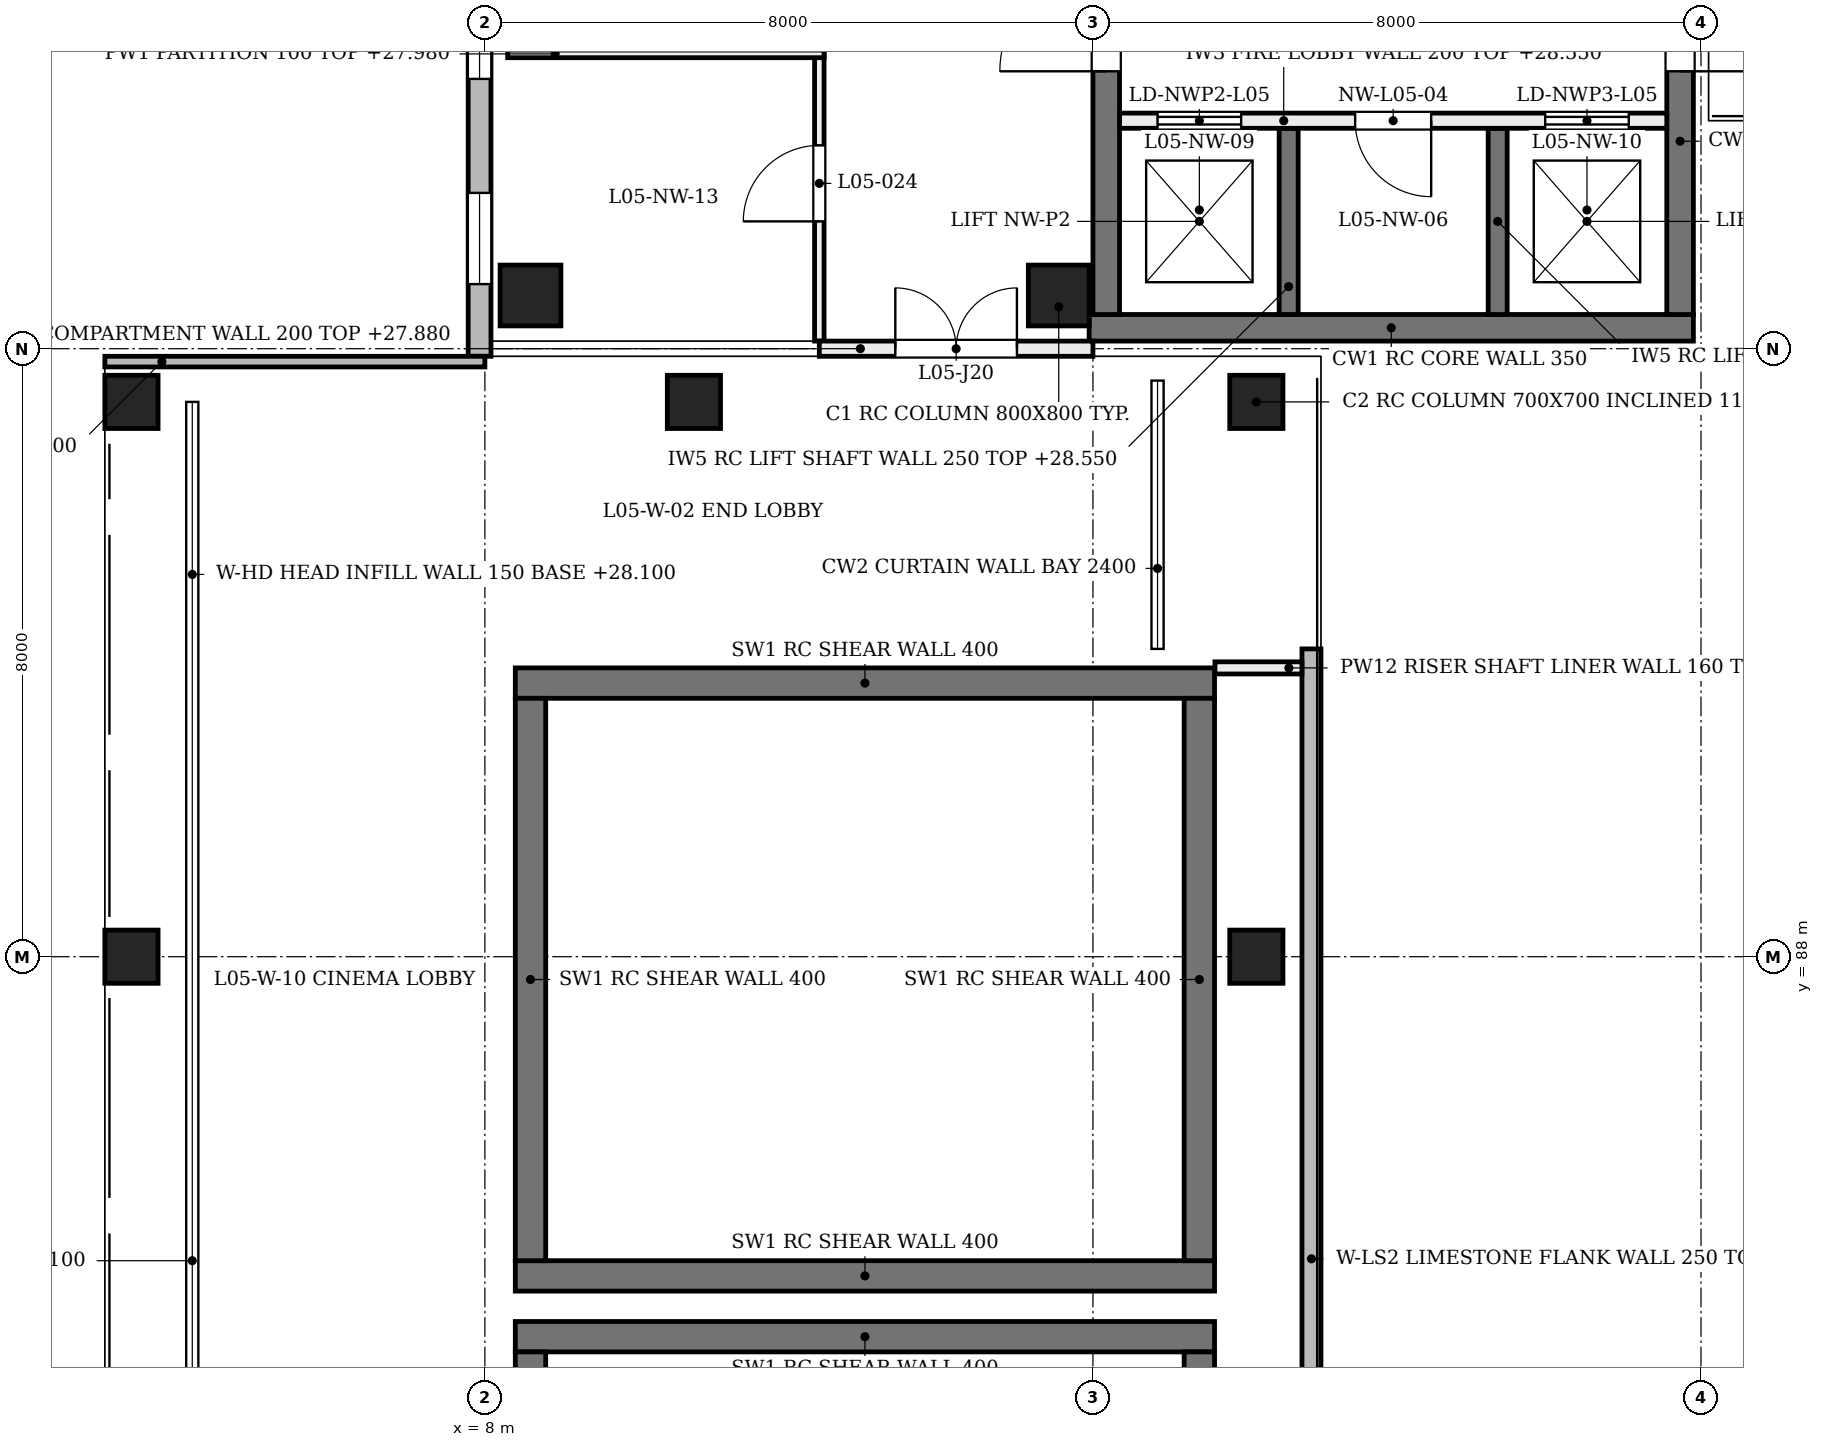
"""IFC4 building model, lengths in metres.
Left out: names, types, materials, properties, quantities, classifications, styles, units other than length and angle.
Written with IfcOpenShell. Run it as: python <this file> out.ifc"""

import sys

from ifc_helpers import new_model, si_unit, direction, frame, frame_2d, origin, origin_2d, place, context, subcontext, project, spatial, rectangle, extrude, element, fill, save


model = new_model("IFC4")
c1 = context("Model", 3, precision=1e-05, world=origin(), true_north=direction((0.0, 1.0)))
c2 = subcontext(c1, "Body", "Model", "MODEL_VIEW")
j1 = project(units=[si_unit("LENGTHUNIT", "METRE"), si_unit("PLANEANGLEUNIT", "RADIAN")], contexts=[c1])
p1 = place(None, origin())
s1 = spatial("IfcSite", under=j1, at=p1, CompositionType="ELEMENT")
p2 = place(p1, origin())
s2 = spatial("IfcBuilding", under=s1, at=p2, CompositionType="ELEMENT")
p3 = place(p2, frame((0.0, 0.0, 24.0)))
s3 = spatial("IfcBuildingStorey", under=s2, at=p3, CompositionType="ELEMENT", Elevation=24.0)
p4 = place(p3, frame((8.4, 83.0, 0.0), z_axis=(0.0, 0.0, 1.0), x_axis=(1.0, 0.0, 0.0)))
e1 = element("IfcWall", 1, at=p4, inside=s3, PredefinedType="SHEAR", context=c2, shape_type="SweptSolid", body=[
    extrude(rectangle(XDim=9.2, YDim=0.4, at=frame_2d((4.6, 0.0))), origin(), (0.0, 0.0, 1.0), 4.58),
])
for number, where, z_axis, x_axis in (
    (2, (8.6, 75.8, 0.0), (0.0, 0.0, 1.0), (0.0, 1.0, 0.0)),
    (3, (17.4, 75.8, 0.0), (0.0, 0.0, 1.0), (0.0, 1.0, 0.0)),
):
    element("IfcWall", number, at=place(p3, frame(where, z_axis=z_axis, x_axis=x_axis)), inside=s3, PredefinedType="SHEAR", context=c2, shape_type="SweptSolid", body=[
        extrude(rectangle(XDim=7.0, YDim=0.4, at=frame_2d((3.5, 0.0))), origin(), (0.0, 0.0, 1.0), 4.58),
    ])
for number, where, z_axis, x_axis in (
    (4, (8.4, 83.8, 0.0), (0.0, 0.0, 1.0), (1.0, 0.0, 0.0)),
    (5, (8.4, 91.6, 0.0), (0.0, 0.0, 1.0), (1.0, 0.0, 0.0)),
):
    element("IfcWall", number, at=place(p3, frame(where, z_axis=z_axis, x_axis=x_axis)), inside=s3, PredefinedType="SHEAR", context=c2, shape_type="SweptSolid", body=[
        extrude(rectangle(XDim=9.2, YDim=0.4, at=frame_2d((4.6, 0.0))), origin(), (0.0, 0.0, 1.0), 4.58),
    ])
for number, where, z_axis, x_axis in (
    (6, (8.6, 84.0, 0.0), (0.0, 0.0, 1.0), (0.0, 1.0, 0.0)),
    (7, (17.4, 84.0, 0.0), (0.0, 0.0, 1.0), (0.0, 1.0, 0.0)),
):
    element("IfcWall", number, at=place(p3, frame(where, z_axis=z_axis, x_axis=x_axis)), inside=s3, PredefinedType="SHEAR", context=c2, shape_type="SweptSolid", body=[
        extrude(rectangle(XDim=7.4, YDim=0.4, at=frame_2d((3.7, 0.0))), origin(), (0.0, 0.0, 1.0), 4.58),
    ])
p5 = place(p3, frame((15.95, 96.275, 0.0), z_axis=(0.0, 0.0, 1.0), x_axis=(1.0, 0.0, 0.0)))
e8 = element("IfcWall", 8, at=p5, inside=s3, PredefinedType="SHEAR", context=c2, shape_type="SweptSolid", body=[
    extrude(rectangle(XDim=7.95, YDim=0.35, at=frame_2d((3.975, 0.0))), origin(), (0.0, 0.0, 1.0), 4.58),
])
p6 = place(p3, frame((16.175, 96.45, 0.0), z_axis=(0.0, 0.0, 1.0), x_axis=(0.0, 1.0, 0.0)))
e9 = element("IfcWall", 9, at=p6, inside=s3, PredefinedType="SHEAR", context=c2, shape_type="SweptSolid", body=[
    extrude(rectangle(XDim=15.2, YDim=0.35, at=frame_2d((7.6, 0.0))), origin(), (0.0, 0.0, 1.0), 4.58),
])
p7 = place(p6, frame((13.25, 0.0, 0.0)))
e10 = element("IfcOpeningElement", 10, at=p7, cuts=e9, PredefinedType="OPENING", context=c2, shape_type="SweptSolid", body=[
    extrude(rectangle(XDim=1.0, YDim=2.1, at=frame_2d((0.5, 1.05))), frame((0.0, 0.185, 0.0), z_axis=(0.0, -1.0, 0.0), x_axis=(1.0, 0.0, 0.0)), (0.0, 0.0, 1.0), 0.37),
])
p8 = place(p6, frame((3.2, 0.0, 0.0)))
e11 = element("IfcOpeningElement", 11, at=p8, cuts=e9, PredefinedType="OPENING", context=c2, shape_type="SweptSolid", body=[
    extrude(rectangle(XDim=1.4, YDim=2.1, at=frame_2d((0.7, 1.05))), frame((0.0, 0.185, 0.0), z_axis=(0.0, -1.0, 0.0), x_axis=(1.0, 0.0, 0.0)), (0.0, 0.0, 1.0), 0.37),
])
p9 = place(p3, frame((23.725, 96.45, 0.0), z_axis=(0.0, 0.0, 1.0), x_axis=(0.0, 1.0, 0.0)))
e12 = element("IfcWall", 12, at=p9, inside=s3, PredefinedType="SHEAR", context=c2, shape_type="SweptSolid", body=[
    extrude(rectangle(XDim=15.2, YDim=0.35, at=frame_2d((7.6, 0.0))), origin(), (0.0, 0.0, 1.0), 4.58),
])
p10 = place(p9, frame((13.25, 0.0, 0.0)))
e13 = element("IfcOpeningElement", 13, at=p10, cuts=e12, PredefinedType="OPENING", context=c2, shape_type="SweptSolid", body=[
    extrude(rectangle(XDim=1.0, YDim=2.1, at=frame_2d((0.5, 1.05))), frame((0.0, 0.185, 0.0), z_axis=(0.0, -1.0, 0.0), x_axis=(1.0, 0.0, 0.0)), (0.0, 0.0, 1.0), 0.37),
])
p11 = place(p9, frame((3.2, 0.0, 0.0)))
e14 = element("IfcOpeningElement", 14, at=p11, cuts=e12, PredefinedType="OPENING", context=c2, shape_type="SweptSolid", body=[
    extrude(rectangle(XDim=1.4, YDim=2.1, at=frame_2d((0.7, 1.05))), frame((0.0, 0.185, 0.0), z_axis=(0.0, -1.0, 0.0), x_axis=(1.0, 0.0, 0.0)), (0.0, 0.0, 1.0), 0.37),
])
for number, where, z_axis, x_axis in (
    (15, (8.6, 96.7, 0.0), (0.0, 0.0, 1.0), (1.0, 0.0, 0.0)),
    (16, (15.55, 96.7, 0.0), (0.0, 0.0, 1.0), (1.0, 0.0, 0.0)),
):
    element("IfcColumn", number, at=place(p3, frame(where, z_axis=z_axis, x_axis=x_axis)), inside=s3, PredefinedType="COLUMN", context=c2, shape_type="SweptSolid", body=[
        extrude(rectangle(XDim=0.8, YDim=0.8, at=origin_2d()), origin(), (0.0, 0.0, 1.0), 4.58),
    ])
for number, where, z_axis, x_axis in (
    (17, (3.6, 88.0, 0.0), (-0.204, 0.0, 0.979), (0.0, -1.0, 0.0)),
    (18, (3.6, 95.3, 0.0), (-0.204, 0.0, 0.979), (0.0, -1.0, 0.0)),
    (19, (11.0, 95.3, 0.0), (-0.204, 0.0, 0.979), (0.0, -1.0, 0.0)),
    (20, (18.4, 88.0, 0.0), (-0.204, 0.0, 0.979), (0.0, -1.0, 0.0)),
    (21, (18.4, 95.3, 0.0), (-0.204, 0.0, 0.979), (0.0, -1.0, 0.0)),
):
    element("IfcColumn", number, at=place(p3, frame(where, z_axis=z_axis, x_axis=x_axis)), inside=s3, PredefinedType="COLUMN", context=c2, shape_type="SweptSolid", body=[
        extrude(rectangle(XDim=0.7, YDim=0.7, at=origin_2d()), origin(), (0.0, 0.0, 1.0), 4.678),
    ])
p12 = place(p3, frame((4.15, 80.2, 4.1), z_axis=(0.0, 0.0, 1.0), x_axis=(0.0, 1.0, 0.0)))
e22 = element("IfcWall", 22, at=p12, inside=s3, PredefinedType="SOLIDWALL", context=c2, shape_type="SweptSolid", body=[
    extrude(rectangle(XDim=7.6, YDim=0.15, at=frame_2d((3.8, 0.0))), origin(), (0.0, 0.0, 1.0), 0.48),
])
p13 = place(p3, frame((4.15, 88.2, 4.1), z_axis=(0.0, 0.0, 1.0), x_axis=(0.0, 1.0, 0.0)))
e23 = element("IfcWall", 23, at=p13, inside=s3, PredefinedType="SOLIDWALL", context=c2, shape_type="SweptSolid", body=[
    extrude(rectangle(XDim=6.9, YDim=0.15, at=frame_2d((3.45, 0.0))), origin(), (0.0, 0.0, 1.0), 0.48),
])
p14 = place(p3, frame((18.875, 67.95, 0.0), z_axis=(0.0, 0.0, 1.0), x_axis=(0.0, 1.0, 0.0)))
e24 = element("IfcWall", 24, at=p14, inside=s3, PredefinedType="SOLIDWALL", context=c2, shape_type="SweptSolid", body=[
    extrude(rectangle(XDim=24.1, YDim=0.25, at=frame_2d((12.05, 0.0))), origin(), (0.0, 0.0, 1.0), 3.9),
])
p15 = place(p3, frame((7.93, 95.9, 0.0), z_axis=(0.0, 0.0, 1.0), x_axis=(0.0, 1.0, 0.0)))
e25 = element("IfcWall", 25, at=p15, inside=s3, PredefinedType="SOLIDWALL", context=c2, shape_type="SweptSolid", body=[
    extrude(rectangle(XDim=16.4, YDim=0.3, at=frame_2d((8.2, 0.0))), origin(), (0.0, 0.0, 1.0), 3.9),
])
p16 = place(p15, frame((0.95, 0.0, 1.0)))
e26 = element("IfcOpeningElement", 26, at=p16, cuts=e25, PredefinedType="OPENING", context=c2, shape_type="SweptSolid", body=[
    extrude(rectangle(XDim=1.2, YDim=2.4, at=frame_2d((0.6, 1.2))), frame((0.0, 0.16, 0.0), z_axis=(0.0, -1.0, 0.0), x_axis=(1.0, 0.0, 0.0)), (0.0, 0.0, 1.0), 0.32),
])
p17 = place(p15, frame((3.65, 0.0, 1.0)))
e27 = element("IfcOpeningElement", 27, at=p17, cuts=e25, PredefinedType="OPENING", context=c2, shape_type="SweptSolid", body=[
    extrude(rectangle(XDim=1.2, YDim=2.4, at=frame_2d((0.6, 1.2))), frame((0.0, 0.16, 0.0), z_axis=(0.0, -1.0, 0.0), x_axis=(1.0, 0.0, 0.0)), (0.0, 0.0, 1.0), 0.32),
])
p18 = place(p15, frame((6.35, 0.0, 1.0)))
e28 = element("IfcOpeningElement", 28, at=p18, cuts=e25, PredefinedType="OPENING", context=c2, shape_type="SweptSolid", body=[
    extrude(rectangle(XDim=1.2, YDim=2.4, at=frame_2d((0.6, 1.2))), frame((0.0, 0.16, 0.0), z_axis=(0.0, -1.0, 0.0), x_axis=(1.0, 0.0, 0.0)), (0.0, 0.0, 1.0), 0.32),
])
p19 = place(p15, frame((9.05, 0.0, 1.0)))
e29 = element("IfcOpeningElement", 29, at=p19, cuts=e25, PredefinedType="OPENING", context=c2, shape_type="SweptSolid", body=[
    extrude(rectangle(XDim=1.2, YDim=2.4, at=frame_2d((0.6, 1.2))), frame((0.0, 0.16, 0.0), z_axis=(0.0, -1.0, 0.0), x_axis=(1.0, 0.0, 0.0)), (0.0, 0.0, 1.0), 0.32),
])
p20 = place(p15, frame((11.75, 0.0, 1.0)))
e30 = element("IfcOpeningElement", 30, at=p20, cuts=e25, PredefinedType="OPENING", context=c2, shape_type="SweptSolid", body=[
    extrude(rectangle(XDim=1.2, YDim=2.4, at=frame_2d((0.6, 1.2))), frame((0.0, 0.16, 0.0), z_axis=(0.0, -1.0, 0.0), x_axis=(1.0, 0.0, 0.0)), (0.0, 0.0, 1.0), 0.32),
])
p21 = place(p15, frame((14.45, 0.0, 1.0)))
e31 = element("IfcOpeningElement", 31, at=p21, cuts=e25, PredefinedType="OPENING", context=c2, shape_type="SweptSolid", body=[
    extrude(rectangle(XDim=1.2, YDim=2.4, at=frame_2d((0.6, 1.2))), frame((0.0, 0.16, 0.0), z_axis=(0.0, -1.0, 0.0), x_axis=(1.0, 0.0, 0.0)), (0.0, 0.0, 1.0), 0.32),
])
p22 = place(p3, frame((3.0, 95.83, 0.0), z_axis=(0.0, 0.0, 1.0), x_axis=(1.0, 0.0, 0.0)))
e32 = element("IfcWall", 32, at=p22, inside=s3, PredefinedType="SOLIDWALL", context=c2, shape_type="SweptSolid", body=[
    extrude(rectangle(XDim=5.0, YDim=0.14, at=frame_2d((2.5, 0.0))), origin(), (0.0, 0.0, 1.0), 3.9),
])
for number, where, z_axis, x_axis in (
    (33, (18.575, 98.9, 0.0), (0.0, 0.0, 1.0), (0.0, -1.0, 0.0)),
    (34, (21.325, 98.9, 0.0), (0.0, 0.0, 1.0), (0.0, -1.0, 0.0)),
):
    element("IfcWall", number, at=place(p3, frame(where, z_axis=z_axis, x_axis=x_axis)), inside=s3, PredefinedType="SOLIDWALL", context=c2, shape_type="SweptSolid", body=[
        extrude(rectangle(XDim=2.45, YDim=0.25, at=frame_2d((1.225, 0.0))), origin(), (0.0, 0.0, 1.0), 4.55),
    ])
p23 = place(p3, frame((16.35, 99.0, 0.0), z_axis=(0.0, 0.0, 1.0), x_axis=(1.0, 0.0, 0.0)))
e35 = element("IfcWall", 35, at=p23, inside=s3, PredefinedType="SOLIDWALL", context=c2, shape_type="SweptSolid", body=[
    extrude(rectangle(XDim=7.2, YDim=0.2, at=frame_2d((3.6, 0.0))), origin(), (0.0, 0.0, 1.0), 4.55),
])
p24 = place(p23, frame((0.5, 0.0, 0.0)))
e36 = element("IfcOpeningElement", 36, at=p24, cuts=e35, PredefinedType="OPENING", context=c2, shape_type="SweptSolid", body=[
    extrude(rectangle(XDim=1.1, YDim=2.1, at=frame_2d((0.55, 1.05))), frame((0.0, 0.11, 0.0), z_axis=(0.0, -1.0, 0.0), x_axis=(1.0, 0.0, 0.0)), (0.0, 0.0, 1.0), 0.22),
])
p25 = place(p23, frame((5.6, 0.0, 0.0)))
e37 = element("IfcOpeningElement", 37, at=p25, cuts=e35, PredefinedType="OPENING", context=c2, shape_type="SweptSolid", body=[
    extrude(rectangle(XDim=1.1, YDim=2.1, at=frame_2d((0.55, 1.05))), frame((0.0, 0.11, 0.0), z_axis=(0.0, -1.0, 0.0), x_axis=(1.0, 0.0, 0.0)), (0.0, 0.0, 1.0), 0.22),
])
p26 = place(p23, frame((3.1, 0.0, 0.0)))
e38 = element("IfcOpeningElement", 38, at=p26, cuts=e35, PredefinedType="OPENING", context=c2, shape_type="SweptSolid", body=[
    extrude(rectangle(XDim=1.0, YDim=2.1, at=frame_2d((0.5, 1.05))), frame((0.0, 0.11, 0.0), z_axis=(0.0, -1.0, 0.0), x_axis=(1.0, 0.0, 0.0)), (0.0, 0.0, 1.0), 0.22),
])
p27 = place(p3, frame((17.605, 91.8, 0.0), z_axis=(0.0, 0.0, 1.0), x_axis=(1.0, 0.0, 0.0)))
e39 = element("IfcWall", 39, at=p27, inside=s3, PredefinedType="PARTITIONING", context=c2, shape_type="SweptSolid", body=[
    extrude(rectangle(XDim=1.145, YDim=0.16, at=frame_2d((0.573, 0.0))), origin(), (0.0, 0.0, 1.0), 3.88),
])
p28 = place(p3, frame((12.4, 96.1, 0.0), z_axis=(0.0, 0.0, 1.0), x_axis=(0.0, 1.0, 0.0)))
e40 = element("IfcWall", 40, at=p28, inside=s3, PredefinedType="PARTITIONING", context=c2, shape_type="SweptSolid", body=[
    extrude(rectangle(XDim=8.844, YDim=0.125, at=frame_2d((4.422, 0.0))), origin(), (0.0, 0.0, 1.0), 3.88),
])
p29 = place(p28, frame((6.117, 0.0, 0.0)))
e41 = element("IfcOpeningElement", 41, at=p29, cuts=e40, PredefinedType="OPENING", context=c2, shape_type="SweptSolid", body=[
    extrude(rectangle(XDim=1.0, YDim=2.1, at=frame_2d((0.5, 1.05))), frame((0.0, 0.073, 0.0), z_axis=(0.0, -1.0, 0.0), x_axis=(1.0, 0.0, 0.0)), (0.0, 0.0, 1.0), 0.145),
])
p30 = place(p28, frame((1.575, 0.0, 0.0)))
e42 = element("IfcOpeningElement", 42, at=p30, cuts=e40, PredefinedType="OPENING", context=c2, shape_type="SweptSolid", body=[
    extrude(rectangle(XDim=1.0, YDim=2.1, at=frame_2d((0.5, 1.05))), frame((0.0, 0.073, 0.0), z_axis=(0.0, -1.0, 0.0), x_axis=(1.0, 0.0, 0.0)), (0.0, 0.0, 1.0), 0.145),
])
p31 = place(p3, frame((8.3, 99.879, 0.0), z_axis=(0.0, 0.0, 1.0), x_axis=(1.0, 0.0, 0.0)))
e43 = element("IfcWall", 43, at=p31, inside=s3, PredefinedType="PARTITIONING", context=c2, shape_type="SweptSolid", body=[
    extrude(rectangle(XDim=4.162, YDim=0.1, at=frame_2d((2.081, 0.0))), origin(), (0.0, 0.0, 1.0), 3.98),
])
p32 = place(p3, frame((12.4, 96.0, 0.0), z_axis=(0.0, 0.0, 1.0), x_axis=(1.0, 0.0, 0.0)))
e44 = element("IfcWall", 44, at=p32, inside=s3, PredefinedType="PARTITIONING", context=c2, shape_type="SweptSolid", body=[
    extrude(rectangle(XDim=3.6, YDim=0.2, at=frame_2d((1.8, 0.0))), origin(), (0.0, 0.0, 1.0), 3.88),
])
p33 = place(p32, frame((1.0, 0.0, 0.0)))
e45 = element("IfcOpeningElement", 45, at=p33, cuts=e44, PredefinedType="OPENING", context=c2, shape_type="SweptSolid", body=[
    extrude(rectangle(XDim=1.6, YDim=2.1, at=frame_2d((0.8, 1.05))), frame((0.0, 0.11, 0.0), z_axis=(0.0, -1.0, 0.0), x_axis=(1.0, 0.0, 0.0)), (0.0, 0.0, 1.0), 0.22),
])
p34 = place(p2, frame((0.0, 0.0, 19.2)))
s4 = spatial("IfcBuildingStorey", under=s2, at=p34, CompositionType="ELEMENT", Elevation=19.2)
p35 = place(p34, frame((9.0, 75.8, 0.0), z_axis=(0.0, 0.0, 1.0), x_axis=(0.0, 1.0, 0.0)))
e46 = element("IfcWall", 46, at=p35, inside=s4, PredefinedType="PARTITIONING", context=c2, shape_type="SweptSolid", body=[
    extrude(rectangle(XDim=7.0, YDim=0.3, at=frame_2d((3.5, 0.0))), origin(), (0.0, 0.0, 1.0), 6.95),
])
p36 = place(p34, frame((9.0, 84.0, 0.0), z_axis=(0.0, 0.0, 1.0), x_axis=(0.0, 1.0, 0.0)))
e47 = element("IfcWall", 47, at=p36, inside=s4, PredefinedType="PARTITIONING", context=c2, shape_type="SweptSolid", body=[
    extrude(rectangle(XDim=7.4, YDim=0.3, at=frame_2d((3.7, 0.0))), origin(), (0.0, 0.0, 1.0), 6.95),
])
p37 = place(p16, origin())
e48 = element("IfcWindow", 48, at=p37, inside=s3, PartitioningType="SINGLE_PANEL", PredefinedType="WINDOW", context=c2, shape_type="SweptSolid", body=[
    extrude(rectangle(XDim=1.2, YDim=2.4, at=frame_2d((0.6, 1.2))), frame((0.0, 0.03, 0.0), z_axis=(0.0, -1.0, 0.0), x_axis=(1.0, 0.0, 0.0)), (0.0, 0.0, 1.0), 0.06),
])
fill(e26, e48)
p38 = place(p17, origin())
e49 = element("IfcWindow", 49, at=p38, inside=s3, PartitioningType="SINGLE_PANEL", PredefinedType="WINDOW", context=c2, shape_type="SweptSolid", body=[
    extrude(rectangle(XDim=1.2, YDim=2.4, at=frame_2d((0.6, 1.2))), frame((0.0, 0.03, 0.0), z_axis=(0.0, -1.0, 0.0), x_axis=(1.0, 0.0, 0.0)), (0.0, 0.0, 1.0), 0.06),
])
fill(e27, e49)
p39 = place(p24, origin())
e50 = element("IfcDoor", 50, at=p39, inside=s3, OperationType="DOUBLE_DOOR_SLIDING", PredefinedType="DOOR", context=c2, shape_type="SweptSolid", body=[
    extrude(rectangle(XDim=1.1, YDim=2.1, at=frame_2d((0.55, 1.05))), frame((0.0, 0.025, 0.0), z_axis=(0.0, -1.0, 0.0), x_axis=(1.0, 0.0, 0.0)), (0.0, 0.0, 1.0), 0.05),
])
fill(e36, e50)
p40 = place(p25, origin())
e51 = element("IfcDoor", 51, at=p40, inside=s3, OperationType="DOUBLE_DOOR_SLIDING", PredefinedType="DOOR", context=c2, shape_type="SweptSolid", body=[
    extrude(rectangle(XDim=1.1, YDim=2.1, at=frame_2d((0.55, 1.05))), frame((0.0, 0.025, 0.0), z_axis=(0.0, -1.0, 0.0), x_axis=(1.0, 0.0, 0.0)), (0.0, 0.0, 1.0), 0.05),
])
fill(e37, e51)
p41 = place(p26, origin())
e52 = element("IfcDoor", 52, at=p41, inside=s3, OperationType="SINGLE_SWING_RIGHT", PredefinedType="DOOR", context=c2, shape_type="SweptSolid", body=[
    extrude(rectangle(XDim=1.0, YDim=2.1, at=frame_2d((0.5, 1.05))), frame((0.0, 0.025, 0.0), z_axis=(0.0, -1.0, 0.0), x_axis=(1.0, 0.0, 0.0)), (0.0, 0.0, 1.0), 0.05),
])
fill(e38, e52)
p42 = place(p8, origin())
e53 = element("IfcDoor", 53, at=p42, inside=s3, OperationType="SINGLE_SWING_LEFT", PredefinedType="DOOR", context=c2, shape_type="SweptSolid", body=[
    extrude(rectangle(XDim=1.4, YDim=2.1, at=frame_2d((0.7, 1.05))), frame((0.0, 0.025, 0.0), z_axis=(0.0, -1.0, 0.0), x_axis=(1.0, 0.0, 0.0)), (0.0, 0.0, 1.0), 0.05),
])
fill(e11, e53)
p43 = place(p11, frame((1.4, 0.0, 0.0), z_axis=(0.0, 0.0, 1.0), x_axis=(-1.0, 0.0, 0.0)))
e54 = element("IfcDoor", 54, at=p43, inside=s3, OperationType="SINGLE_SWING_LEFT", PredefinedType="DOOR", context=c2, shape_type="SweptSolid", body=[
    extrude(rectangle(XDim=1.4, YDim=2.1, at=frame_2d((0.7, 1.05))), frame((0.0, 0.025, 0.0), z_axis=(0.0, -1.0, 0.0), x_axis=(1.0, 0.0, 0.0)), (0.0, 0.0, 1.0), 0.05),
])
fill(e14, e54)
p44 = place(p30, origin())
e55 = element("IfcDoor", 55, at=p44, inside=s3, OperationType="SINGLE_SWING_LEFT", PredefinedType="DOOR", context=c2, shape_type="SweptSolid", body=[
    extrude(rectangle(XDim=1.0, YDim=2.1, at=frame_2d((0.5, 1.05))), frame((0.0, 0.025, 0.0), z_axis=(0.0, -1.0, 0.0), x_axis=(1.0, 0.0, 0.0)), (0.0, 0.0, 1.0), 0.05),
])
fill(e42, e55)
p45 = place(p33, origin())
e56 = element("IfcDoor", 56, at=p45, inside=s3, OperationType="DOUBLE_DOOR_SINGLE_SWING", PredefinedType="DOOR", context=c2, shape_type="SweptSolid", body=[
    extrude(rectangle(XDim=1.6, YDim=2.1, at=frame_2d((0.8, 1.05))), frame((0.0, 0.025, 0.0), z_axis=(0.0, -1.0, 0.0), x_axis=(1.0, 0.0, 0.0)), (0.0, 0.0, 1.0), 0.05),
])
fill(e45, e56)
save(model, sys.argv[1])
